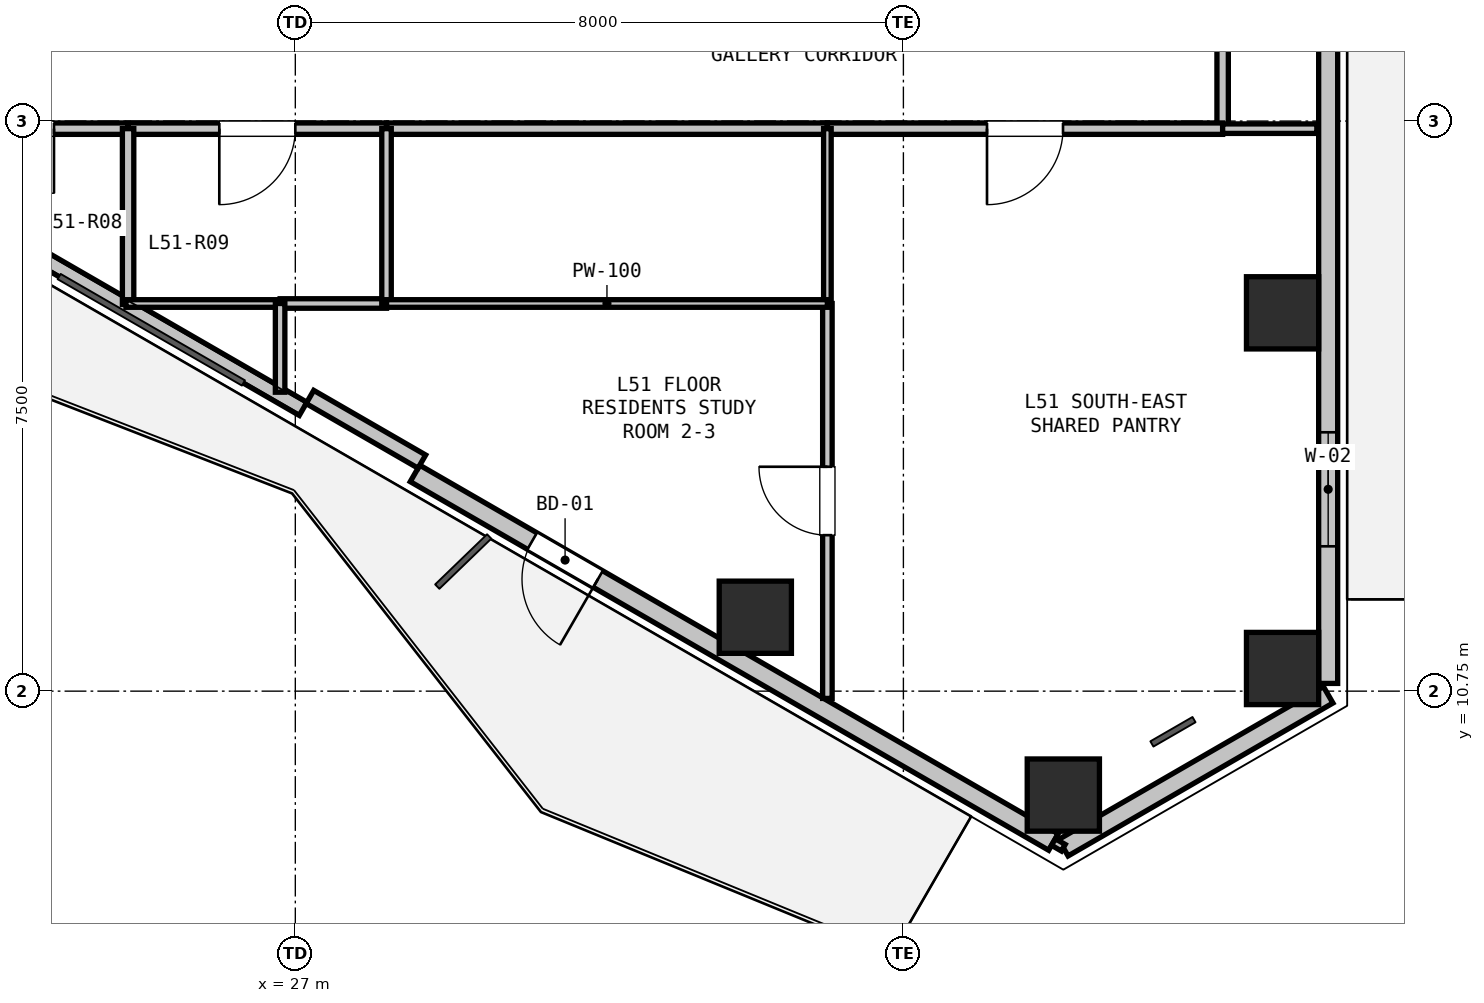
"""IFC4 building model, lengths in metres.
Left out: names, types, materials, properties, quantities, classifications, styles, units other than length and angle.
Written with IfcOpenShell. Run it as: python <this file> out.ifc"""

import sys

from ifc_helpers import new_model, si_unit, direction, frame, frame_2d, origin, origin_2d, place, context, subcontext, project, spatial, rectangle, hollow_rectangle, extrude, element, fill, save


model = new_model("IFC4")
c1 = context("Model", 3, precision=1e-05, world=origin(), true_north=direction((0.0, 1.0)))
c2 = subcontext(c1, "Body", "Model", "MODEL_VIEW")
j1 = project(units=[si_unit("LENGTHUNIT", "METRE"), si_unit("PLANEANGLEUNIT", "RADIAN")], contexts=[c1])
p1 = place(None, origin())
s1 = spatial("IfcSite", under=j1, at=p1, CompositionType="ELEMENT")
p2 = place(p1, origin())
s2 = spatial("IfcBuilding", under=s1, at=p2, CompositionType="ELEMENT")
p3 = place(p2, frame((0.0, 0.0, 185.4)))
s3 = spatial("IfcBuildingStorey", under=s2, at=p3, CompositionType="ELEMENT", Elevation=185.4)
for number, where, z_axis, x_axis in (
    (1, (39.988, 15.727, 0.0), (0.0, 0.0, 1.0), (1.0, 0.0, 0.0)),
    (2, (39.988, 11.048, 0.0), (0.0, 0.0, 1.0), (1.0, 0.0, 0.0)),
    (3, (37.104, 9.383, 0.0), (0.0, 0.0, 1.0), (1.0, 0.0, 0.0)),
    (4, (33.052, 11.722, 0.0), (0.0, 0.0, 1.0), (1.0, 0.0, 0.0)),
):
    element("IfcColumn", number, at=place(p3, frame(where, z_axis=z_axis, x_axis=x_axis)), inside=s3, PredefinedType="COLUMN", context=c2, shape_type="SweptSolid", body=[
        extrude(hollow_rectangle(XDim=0.95, YDim=0.95, WallThickness=0.028, at=origin_2d()), origin(), (0.0, 0.0, 1.0), 3.3),
    ])
p4 = place(p3, frame((40.588, 10.702, 0.0), z_axis=(0.0, 0.0, 1.0), x_axis=(-0.866023907196, -0.500002592159, 0.0)))
e5 = element("IfcWall", 5, at=p4, inside=s3, PredefinedType="SOLIDWALL", context=c2, shape_type="SweptSolid", body=[
    extrude(rectangle(XDim=4.023, YDim=0.25, at=frame_2d((2.012, 0.0))), origin(), (0.0, 0.0, 1.0), 2.69),
])
p5 = place(p3, frame((40.588, 20.551, 0.0), z_axis=(0.0, 0.0, 1.0), x_axis=(0.0, -1.0, 0.0)))
e6 = element("IfcWall", 6, at=p5, inside=s3, PredefinedType="SOLIDWALL", context=c2, shape_type="SweptSolid", body=[
    extrude(rectangle(XDim=9.699, YDim=0.25, at=frame_2d((4.85, 0.0))), origin(), (0.0, 0.0, 1.0), 2.69),
])
p6 = place(p5, frame((6.395, 0.0, 0.9)))
e7 = element("IfcOpeningElement", 7, at=p6, cuts=e6, PredefinedType="OPENING", context=c2, shape_type="SweptSolid", body=[
    extrude(rectangle(XDim=1.5, YDim=1.5, at=frame_2d((0.75, 0.75))), frame((0.0, 0.135, 0.0), z_axis=(0.0, -1.0, 0.0), x_axis=(1.0, 0.0, 0.0)), (0.0, 0.0, 1.0), 0.27),
])
p7 = place(p3, frame((36.974, 8.765, 0.0), z_axis=(0.0, 0.0, 1.0), x_axis=(-0.866016233231, 0.500015883528, 0.0)))
e8 = element("IfcWall", 8, at=p7, inside=s3, PredefinedType="SOLIDWALL", context=c2, shape_type="SweptSolid", body=[
    extrude(rectangle(XDim=9.699, YDim=0.25, at=frame_2d((4.85, 0.0))), origin(), (0.0, 0.0, 1.0), 2.69),
])
p8 = place(p7, frame((6.919, 0.0, 0.0)))
e9 = element("IfcOpeningElement", 9, at=p8, cuts=e8, PredefinedType="OPENING", context=c2, shape_type="SweptSolid", body=[
    extrude(rectangle(XDim=1.0, YDim=2.1, at=frame_2d((0.5, 1.05))), frame((0.0, 0.135, 0.0), z_axis=(0.0, -1.0, 0.0), x_axis=(1.0, 0.0, 0.0)), (0.0, 0.0, 1.0), 0.27),
])
p9 = place(p3, frame((27.102, 14.464, 0.0), z_axis=(0.0, 0.0, 1.0), x_axis=(-0.866020680503, 0.500008180874, 0.0)))
e10 = element("IfcWall", 10, at=p9, inside=s3, PredefinedType="PARAPET", context=c2, shape_type="SweptSolid", body=[
    extrude(rectangle(XDim=8.999, YDim=0.2, at=frame_2d((4.5, 0.0))), origin(), (0.0, 0.0, 1.0), 0.2),
])
p10 = place(p3, frame((28.665, 13.77, 0.0), z_axis=(0.0, 0.0, 1.0), x_axis=(-0.866025371046, 0.500000056704, 0.0)))
e11 = element("IfcWall", 11, at=p10, inside=s3, PredefinedType="PARAPET", context=c2, shape_type="SweptSolid", body=[
    extrude(rectangle(XDim=1.7, YDim=0.2, at=frame_2d((0.85, 0.0))), origin(), (0.0, 0.0, 1.0), 2.69),
])
p11 = place(p3, frame((39.2, 19.9, 0.0), z_axis=(0.0, 0.0, 1.0), x_axis=(0.0, -1.0, 0.0)))
e12 = element("IfcWall", 12, at=p11, inside=s3, PredefinedType="PARTITIONING", context=c2, shape_type="SweptSolid", body=[
    extrude(rectangle(XDim=1.75, YDim=0.15, at=frame_2d((0.875, 0.0))), origin(), (0.0, 0.0, 1.0), 3.07),
])
p12 = place(p3, frame((39.2, 18.15, 0.0), z_axis=(0.0, 0.0, 1.0), x_axis=(-1.0, 0.0, 0.0)))
e13 = element("IfcWall", 13, at=p12, inside=s3, PredefinedType="PARTITIONING", context=c2, shape_type="SweptSolid", body=[
    extrude(rectangle(XDim=5.2, YDim=0.15, at=frame_2d((2.6, 0.0))), origin(), (0.0, 0.0, 1.0), 2.518),
])
p13 = place(p12, frame((2.1, 0.0, 0.0)))
e14 = element("IfcOpeningElement", 14, at=p13, cuts=e13, PredefinedType="OPENING", context=c2, shape_type="SweptSolid", body=[
    extrude(rectangle(XDim=1.0, YDim=2.15, at=frame_2d((0.5, 1.075))), frame((0.0, 0.085, 0.0), z_axis=(0.0, -1.0, 0.0), x_axis=(1.0, 0.0, 0.0)), (0.0, 0.0, 1.0), 0.17),
])
p14 = place(p3, frame((34.0, 18.15, 0.0), z_axis=(0.0, 0.0, 1.0), x_axis=(-1.0, 0.0, 0.0)))
e15 = element("IfcWall", 15, at=p14, inside=s3, PredefinedType="PARTITIONING", context=c2, shape_type="SweptSolid", body=[
    extrude(rectangle(XDim=5.8, YDim=0.15, at=frame_2d((2.9, 0.0))), origin(), (0.0, 0.0, 1.0), 3.07),
])
p15 = place(p3, frame((28.2, 18.15, 0.0), z_axis=(0.0, 0.0, 1.0), x_axis=(-1.0, 0.0, 0.0)))
e16 = element("IfcWall", 16, at=p15, inside=s3, PredefinedType="PARTITIONING", context=c2, shape_type="SweptSolid", body=[
    extrude(rectangle(XDim=3.4, YDim=0.15, at=frame_2d((1.7, 0.0))), origin(), (0.0, 0.0, 1.0), 2.518),
])
p16 = place(p15, frame((1.2, 0.0, 0.0)))
e17 = element("IfcOpeningElement", 17, at=p16, cuts=e16, PredefinedType="OPENING", context=c2, shape_type="SweptSolid", body=[
    extrude(rectangle(XDim=1.0, YDim=2.15, at=frame_2d((0.5, 1.075))), frame((0.0, 0.085, 0.0), z_axis=(0.0, -1.0, 0.0), x_axis=(1.0, 0.0, 0.0)), (0.0, 0.0, 1.0), 0.17),
])
p17 = place(p3, frame((24.8, 18.15, 0.0), z_axis=(0.0, 0.0, 1.0), x_axis=(-1.0, 0.0, 0.0)))
e18 = element("IfcWall", 18, at=p17, inside=s3, PredefinedType="PARTITIONING", context=c2, shape_type="SweptSolid", body=[
    extrude(rectangle(XDim=2.8, YDim=0.15, at=frame_2d((1.4, 0.0))), origin(), (0.0, 0.0, 1.0), 2.365),
])
p18 = place(p17, frame((0.975, 0.0, 0.0)))
e19 = element("IfcOpeningElement", 19, at=p18, cuts=e18, PredefinedType="OPENING", context=c2, shape_type="SweptSolid", body=[
    extrude(rectangle(XDim=0.85, YDim=2.1, at=frame_2d((0.425, 1.05))), frame((0.0, 0.085, 0.0), z_axis=(0.0, -1.0, 0.0), x_axis=(1.0, 0.0, 0.0)), (0.0, 0.0, 1.0), 0.17),
])
p19 = place(p3, frame((37.104, 8.69, 0.0), z_axis=(0.0, 0.0, 1.0), x_axis=(-0.866131372301, 0.499816412211, 0.0)))
e20 = element("IfcWall", 20, at=p19, inside=s3, PredefinedType="PARTITIONING", context=c2, shape_type="SweptSolid", body=[
    extrude(rectangle(XDim=0.15, YDim=0.1, at=frame_2d((0.075, 0.0))), origin(), (0.0, 0.0, 1.0), 3.07),
])
p20 = place(p3, frame((34.0, 10.654, 0.0), z_axis=(0.0, 0.0, 1.0), x_axis=(0.0, 1.0, 0.0)))
e21 = element("IfcWall", 21, at=p20, inside=s3, PredefinedType="PARTITIONING", context=c2, shape_type="SweptSolid", body=[
    extrude(rectangle(XDim=5.196, YDim=0.125, at=frame_2d((2.598, 0.0))), origin(), (0.0, 0.0, 1.0), 2.735),
])
p21 = place(p20, frame((2.148, 0.0, 0.0)))
e22 = element("IfcOpeningElement", 22, at=p21, cuts=e21, PredefinedType="OPENING", context=c2, shape_type="SweptSolid", body=[
    extrude(rectangle(XDim=0.9, YDim=2.1, at=frame_2d((0.45, 1.05))), frame((0.0, 0.073, 0.0), z_axis=(0.0, -1.0, 0.0), x_axis=(1.0, 0.0, 0.0)), (0.0, 0.0, 1.0), 0.145),
])
p22 = place(p3, frame((34.0, 15.85, 0.0), z_axis=(0.0, 0.0, 1.0), x_axis=(0.0, 1.0, 0.0)))
e23 = element("IfcWall", 23, at=p22, inside=s3, PredefinedType="PARTITIONING", context=c2, shape_type="SweptSolid", body=[
    extrude(rectangle(XDim=2.3, YDim=0.1, at=frame_2d((1.15, 0.0))), origin(), (0.0, 0.0, 1.0), 3.07),
])
p23 = place(p3, frame((39.2, 18.15, 0.0), z_axis=(0.0, 0.0, 1.0), x_axis=(1.0, 0.0, 0.0)))
e24 = element("IfcWall", 24, at=p23, inside=s3, PredefinedType="PARTITIONING", context=c2, shape_type="SweptSolid", body=[
    extrude(rectangle(XDim=1.24, YDim=0.125, at=frame_2d((0.62, 0.0))), origin(), (0.0, 0.0, 1.0), 2.365),
])
p24 = place(p3, frame((24.8, 18.15, 0.0), z_axis=(0.0, 0.0, 1.0), x_axis=(0.0, -1.0, 0.0)))
e25 = element("IfcWall", 25, at=p24, inside=s3, PredefinedType="PARTITIONING", context=c2, shape_type="SweptSolid", body=[
    extrude(rectangle(XDim=2.312, YDim=0.15, at=frame_2d((1.156, 0.0))), origin(), (0.0, 0.0, 1.0), 2.365),
])
p25 = place(p3, frame((28.2, 15.85, 0.0), z_axis=(0.0, 0.0, 1.0), x_axis=(-1.0, 0.0, 0.0)))
e26 = element("IfcWall", 26, at=p25, inside=s3, PredefinedType="PARTITIONING", context=c2, shape_type="SweptSolid", body=[
    extrude(rectangle(XDim=1.4, YDim=0.125, at=frame_2d((0.7, 0.0))), origin(), (0.0, 0.0, 1.0), 2.518),
])
p26 = place(p3, frame((26.8, 15.85, 0.0), z_axis=(0.0, 0.0, 1.0), x_axis=(-1.0, 0.0, 0.0)))
e27 = element("IfcWall", 27, at=p26, inside=s3, PredefinedType="PARTITIONING", context=c2, shape_type="SweptSolid", body=[
    extrude(rectangle(XDim=2.029, YDim=0.1, at=frame_2d((1.014, 0.0))), origin(), (0.0, 0.0, 1.0), 2.365),
])
p27 = place(p3, frame((28.2, 18.15, 0.0), z_axis=(0.0, 0.0, 1.0), x_axis=(0.0, -1.0, 0.0)))
e28 = element("IfcWall", 28, at=p27, inside=s3, PredefinedType="PARTITIONING", context=c2, shape_type="SweptSolid", body=[
    extrude(rectangle(XDim=2.3, YDim=0.125, at=frame_2d((1.15, 0.0))), origin(), (0.0, 0.0, 1.0), 3.07),
])
p28 = place(p3, frame((28.2, 15.85, 0.0), z_axis=(0.0, 0.0, 1.0), x_axis=(1.0, 0.0, 0.0)))
e29 = element("IfcWall", 29, at=p28, inside=s3, PredefinedType="PARTITIONING", context=c2, shape_type="SweptSolid", body=[
    extrude(rectangle(XDim=5.8, YDim=0.1, at=frame_2d((2.9, 0.0))), origin(), (0.0, 0.0, 1.0), 3.07),
])
p29 = place(p3, frame((26.8, 14.683, 0.0), z_axis=(0.0, 0.0, 1.0), x_axis=(0.0, 1.0, 0.0)))
e30 = element("IfcWall", 30, at=p29, inside=s3, PredefinedType="PARTITIONING", context=c2, shape_type="SweptSolid", body=[
    extrude(rectangle(XDim=1.167, YDim=0.125, at=frame_2d((0.583, 0.0))), origin(), (0.0, 0.0, 1.0), 2.365),
])
p30 = place(p6, origin())
e31 = element("IfcWindow", 31, at=p30, inside=s3, PartitioningType="SINGLE_PANEL", PredefinedType="WINDOW", context=c2, shape_type="SweptSolid", body=[
    extrude(rectangle(XDim=1.5, YDim=1.5, at=frame_2d((0.75, 0.75))), frame((0.0, 0.03, 0.0), z_axis=(0.0, -1.0, 0.0), x_axis=(1.0, 0.0, 0.0)), (0.0, 0.0, 1.0), 0.06),
])
fill(e7, e31)
p31 = place(p8, origin())
e32 = element("IfcDoor", 32, at=p31, inside=s3, OperationType="SINGLE_SWING_LEFT", PredefinedType="DOOR", context=c2, shape_type="SweptSolid", body=[
    extrude(rectangle(XDim=1.0, YDim=2.1, at=frame_2d((0.5, 1.05))), frame((0.0, 0.025, 0.0), z_axis=(0.0, -1.0, 0.0), x_axis=(1.0, 0.0, 0.0)), (0.0, 0.0, 1.0), 0.05),
])
fill(e9, e32)
p32 = place(p13, origin())
e33 = element("IfcDoor", 33, at=p32, inside=s3, OperationType="SINGLE_SWING_RIGHT", PredefinedType="DOOR", context=c2, shape_type="SweptSolid", body=[
    extrude(rectangle(XDim=1.0, YDim=2.15, at=frame_2d((0.5, 1.075))), frame((0.0, 0.025, 0.0), z_axis=(0.0, -1.0, 0.0), x_axis=(1.0, 0.0, 0.0)), (0.0, 0.0, 1.0), 0.05),
])
fill(e14, e33)
p33 = place(p18, origin())
e34 = element("IfcDoor", 34, at=p33, inside=s3, OperationType="SINGLE_SWING_LEFT", PredefinedType="DOOR", context=c2, shape_type="SweptSolid", body=[
    extrude(rectangle(XDim=0.85, YDim=2.1, at=frame_2d((0.425, 1.05))), frame((0.0, 0.025, 0.0), z_axis=(0.0, -1.0, 0.0), x_axis=(1.0, 0.0, 0.0)), (0.0, 0.0, 1.0), 0.05),
])
fill(e19, e34)
p34 = place(p16, origin())
e35 = element("IfcDoor", 35, at=p34, inside=s3, OperationType="SINGLE_SWING_RIGHT", PredefinedType="DOOR", context=c2, shape_type="SweptSolid", body=[
    extrude(rectangle(XDim=1.0, YDim=2.15, at=frame_2d((0.5, 1.075))), frame((0.0, 0.025, 0.0), z_axis=(0.0, -1.0, 0.0), x_axis=(1.0, 0.0, 0.0)), (0.0, 0.0, 1.0), 0.05),
])
fill(e17, e35)
p35 = place(p21, origin())
e36 = element("IfcDoor", 36, at=p35, inside=s3, OperationType="SINGLE_SWING_RIGHT", PredefinedType="DOOR", context=c2, shape_type="SweptSolid", body=[
    extrude(rectangle(XDim=0.9, YDim=2.1, at=frame_2d((0.45, 1.05))), frame((0.0, 0.025, 0.0), z_axis=(0.0, -1.0, 0.0), x_axis=(1.0, 0.0, 0.0)), (0.0, 0.0, 1.0), 0.05),
])
fill(e22, e36)
save(model, sys.argv[1])
